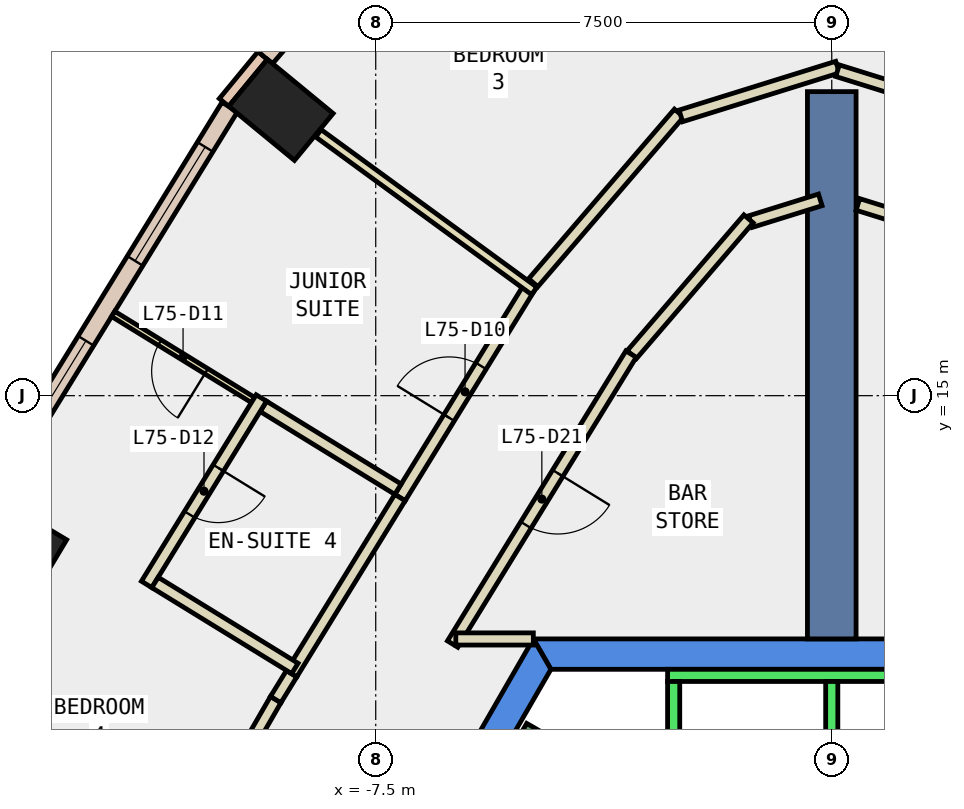
"""IFC4 building model, lengths in metres.
Left out: names, types, materials, properties, quantities, classifications, styles, units other than length and angle.
Written with IfcOpenShell. Run it as: python <this file> out.ifc"""

import sys

from ifc_helpers import new_model, si_unit, direction, frame, frame_2d, origin, origin_2d, place, context, subcontext, project, spatial, polyline, rectangle, outline, extrude, element, fill, save


model = new_model("IFC4")
c1 = context("Model", 3, precision=1e-05, world=origin(), true_north=direction((0.0, 1.0)))
c2 = subcontext(c1, "Body", "Model", "MODEL_VIEW")
j1 = project(units=[si_unit("LENGTHUNIT", "METRE"), si_unit("PLANEANGLEUNIT", "RADIAN")], contexts=[c1])
p1 = place(None, origin())
s1 = spatial("IfcSite", under=j1, at=p1, CompositionType="ELEMENT")
p2 = place(p1, origin())
s2 = spatial("IfcBuilding", under=s1, at=p2, CompositionType="ELEMENT")
p3 = place(p2, frame((0.0, 0.0, 318.8)))
s3 = spatial("IfcBuildingStorey", under=s2, at=p3, CompositionType="ELEMENT", Elevation=318.8)
for number, where, z_axis, x_axis in (
    (1, (-9.059, 19.7, -0.34), (0.0, 0.0, 1.0), (0.636, 0.772, 0.0)),
    (2, (-13.441, 12.561, -0.34), (0.0, 0.0, 1.0), (0.514, 0.858, 0.0)),
):
    element("IfcColumn", number, at=place(p3, frame(where, z_axis=z_axis, x_axis=x_axis)), inside=s3, PredefinedType="COLUMN", context=c2, shape_type="SweptSolid", body=[
        extrude(rectangle(XDim=1.0, YDim=1.4, at=origin_2d()), origin(), (0.0, 0.0, 1.0), 3.6),
    ])
p4 = place(p3, frame((0.0, 0.0, -0.34)))
e3 = element("IfcWall", 3, at=p4, inside=s3, PredefinedType="SHEAR", context=c2, shape_type="SweptSolid", body=[
    extrude(outline(polyline([(4.907, 11.0), (-4.907, 11.0), (-4.619, 10.5), (4.619, 10.5), (4.907, 11.0)])), origin(), (0.0, 0.0, 1.0), 3.6),
])
p5 = place(p3, frame((0.0, 0.0, -0.34)))
e4 = element("IfcWall", 4, at=p5, inside=s3, PredefinedType="SHEAR", context=c2, shape_type="SweptSolid", body=[
    extrude(outline(polyline([(-9.236, 3.502), (-8.803, 3.253), (-4.619, 10.5), (-4.907, 11.0), (-9.236, 3.502)])), origin(), (0.0, 0.0, 1.0), 3.6),
])
p6 = place(p3, frame((0.0, 11.0, -0.34), z_axis=(0.0, 0.0, 1.0), x_axis=(0.0, 1.0, 0.0)))
e5 = element("IfcWall", 5, at=p6, inside=s3, PredefinedType="SHEAR", context=c2, shape_type="SweptSolid", body=[
    extrude(rectangle(XDim=9.0, YDim=0.8, at=frame_2d((4.5, 0.0))), origin(), (0.0, 0.0, 1.0), 3.6),
])
p7 = place(p3, frame((-9.359, 20.594, 0.0), z_axis=(0.0, 0.0, 1.0), x_axis=(-0.635998056672, -0.771690658172, 0.0)))
e6 = element("IfcWall", 6, at=p7, inside=s3, PredefinedType="STANDARD", context=c2, shape_type="SweptSolid", body=[
    extrude(rectangle(XDim=1.0, YDim=0.2, at=frame_2d((0.5, 0.0))), origin(), (0.0, 0.0, 1.0), 3.26),
])
p8 = place(p3, frame((-6.219, 24.156, 0.0), z_axis=(0.0, 0.0, 1.0), x_axis=(-0.651684474108, -0.758490175419, 0.0)))
e7 = element("IfcWall", 7, at=p8, inside=s3, PredefinedType="STANDARD", context=c2, shape_type="SweptSolid", body=[
    extrude(rectangle(XDim=4.748, YDim=0.3, at=frame_2d((2.374, 0.0))), origin(), (0.0, 0.0, 1.0), 3.26),
])
p9 = place(p8, frame((1.674, 0.0, 0.9)))
e8 = element("IfcOpeningElement", 8, at=p9, cuts=e7, PredefinedType="OPENING", context=c2, shape_type="SweptSolid", body=[
    extrude(rectangle(XDim=1.4, YDim=2.0, at=frame_2d((0.7, 1.0))), frame((0.0, 0.16, 0.0), z_axis=(0.0, -1.0, 0.0), x_axis=(1.0, 0.0, 0.0)), (0.0, 0.0, 1.0), 0.32),
])
p10 = place(p3, frame((-9.901, 19.747, 0.0), z_axis=(0.0, 0.0, 1.0), x_axis=(-0.524004608874, -0.851715427757, 0.0)))
e9 = element("IfcWall", 9, at=p10, inside=s3, PredefinedType="STANDARD", context=c2, shape_type="SweptSolid", body=[
    extrude(rectangle(XDim=7.485, YDim=0.3, at=frame_2d((3.742, 0.0))), origin(), (0.0, 0.0, 1.0), 3.26),
])
p11 = place(p10, frame((0.771, 0.0, 0.9)))
e10 = element("IfcOpeningElement", 10, at=p11, cuts=e9, PredefinedType="OPENING", context=c2, shape_type="SweptSolid", body=[
    extrude(rectangle(XDim=2.2, YDim=2.0, at=frame_2d((1.1, 1.0))), frame((0.0, 0.16, 0.0), z_axis=(0.0, -1.0, 0.0), x_axis=(1.0, 0.0, 0.0)), (0.0, 0.0, 1.0), 0.32),
])
p12 = place(p10, frame((4.514, 0.0, 0.9)))
e11 = element("IfcOpeningElement", 11, at=p12, cuts=e9, PredefinedType="OPENING", context=c2, shape_type="SweptSolid", body=[
    extrude(rectangle(XDim=2.2, YDim=2.0, at=frame_2d((1.1, 1.0))), frame((0.0, 0.16, 0.0), z_axis=(0.0, -1.0, 0.0), x_axis=(1.0, 0.0, 0.0)), (0.0, 0.0, 1.0), 0.32),
])
p13 = place(p3, frame((1.339, 17.862, 0.0), z_axis=(0.0, 0.0, 1.0), x_axis=(-0.954826063502, 0.297165254457, 0.0)))
e12 = element("IfcWall", 12, at=p13, inside=s3, PredefinedType="PARTITIONING", context=c2, shape_type="SweptSolid", body=[
    extrude(rectangle(XDim=0.952, YDim=0.2, at=frame_2d((0.476, 0.0))), origin(), (0.0, 0.0, 1.0), 3.26),
])
p14 = place(p3, frame((-0.189, 18.22, 0.0), z_axis=(0.0, 0.0, 1.0), x_axis=(-0.954836332451, -0.297132257137, 0.0)))
e13 = element("IfcWall", 13, at=p14, inside=s3, PredefinedType="PARTITIONING", context=c2, shape_type="SweptSolid", body=[
    extrude(rectangle(XDim=1.205, YDim=0.2, at=frame_2d((0.602, 0.0))), origin(), (0.0, 0.0, 1.0), 3.26),
])
p15 = place(p3, frame((-1.369, 17.908, 0.0), z_axis=(0.0, 0.0, 1.0), x_axis=(-0.651848676423, -0.758349064116, 0.0)))
e14 = element("IfcWall", 14, at=p15, inside=s3, PredefinedType="PARTITIONING", context=c2, shape_type="SweptSolid", body=[
    extrude(rectangle(XDim=2.946, YDim=0.2, at=frame_2d((1.473, 0.0))), origin(), (0.0, 0.0, 1.0), 3.26),
])
p16 = place(p3, frame((-3.301, 15.684, 0.0), z_axis=(0.0, 0.0, 1.0), x_axis=(-0.524004979532, -0.851715199715, 0.0)))
e15 = element("IfcWall", 15, at=p16, inside=s3, PredefinedType="PARTITIONING", context=c2, shape_type="SweptSolid", body=[
    extrude(rectangle(XDim=5.599, YDim=0.2, at=frame_2d((2.8, 0.0))), origin(), (0.0, 0.0, 1.0), 3.26),
])
p17 = place(p16, frame((2.3, 0.0, 0.0)))
e16 = element("IfcOpeningElement", 16, at=p17, cuts=e15, PredefinedType="OPENING", context=c2, shape_type="SweptSolid", body=[
    extrude(rectangle(XDim=1.0, YDim=2.1, at=frame_2d((0.5, 1.05))), frame((0.0, 0.11, 0.0), z_axis=(0.0, -1.0, 0.0), x_axis=(1.0, 0.0, 0.0)), (0.0, 0.0, 1.0), 0.22),
])
p18 = place(p3, frame((-6.183, 10.999, 0.0), z_axis=(0.0, 0.0, 1.0), x_axis=(1.0, 0.0, 0.0)))
e17 = element("IfcWall", 17, at=p18, inside=s3, PredefinedType="PARTITIONING", context=c2, shape_type="SweptSolid", body=[
    extrude(rectangle(XDim=1.275, YDim=0.2, at=frame_2d((0.638, 0.0))), origin(), (0.0, 0.0, 1.0), 3.26),
])
p19 = place(p3, frame((-4.909, 16.858, 0.0), z_axis=(0.0, 0.0, 1.0), x_axis=(0.651785835936, 0.758403074937, 0.0)))
e18 = element("IfcWall", 18, at=p19, inside=s3, PredefinedType="PARTITIONING", context=c2, shape_type="SweptSolid", body=[
    extrude(rectangle(XDim=3.677, YDim=0.2, at=frame_2d((1.839, 0.0))), origin(), (0.0, 0.0, 1.0), 3.26),
])
p20 = place(p3, frame((-2.482, 19.601, 0.0), z_axis=(0.0, 0.0, 1.0), x_axis=(0.95482540871, 0.297167358372, 0.0)))
e19 = element("IfcWall", 19, at=p20, inside=s3, PredefinedType="PARTITIONING", context=c2, shape_type="SweptSolid", body=[
    extrude(rectangle(XDim=2.699, YDim=0.2, at=frame_2d((1.349, 0.0))), origin(), (0.0, 0.0, 1.0), 3.26),
])
p21 = place(p3, frame((0.095, 20.344, 0.0), z_axis=(0.0, 0.0, 1.0), x_axis=(0.954837867825, -0.297127323158, 0.0)))
e20 = element("IfcWall", 20, at=p21, inside=s3, PredefinedType="PARTITIONING", context=c2, shape_type="SweptSolid", body=[
    extrude(rectangle(XDim=2.605, YDim=0.2, at=frame_2d((1.302, 0.0))), origin(), (0.0, 0.0, 1.0), 3.26),
])
p22 = place(p3, frame((-7.101, 13.324, 0.0), z_axis=(0.0, 0.0, 1.0), x_axis=(0.52395735307, 0.851744499344, 0.0)))
e21 = element("IfcWall", 21, at=p22, inside=s3, PredefinedType="PARTITIONING", context=c2, shape_type="SweptSolid", body=[
    extrude(rectangle(XDim=4.084, YDim=0.2, at=frame_2d((2.042, 0.0))), origin(), (0.0, 0.0, 1.0), 3.26),
])
p23 = place(p22, frame((1.542, 0.0, 0.0)))
e22 = element("IfcOpeningElement", 22, at=p23, cuts=e21, PredefinedType="OPENING", context=c2, shape_type="SweptSolid", body=[
    extrude(rectangle(XDim=1.0, YDim=2.1, at=frame_2d((0.5, 1.05))), frame((0.0, 0.11, 0.0), z_axis=(0.0, -1.0, 0.0), x_axis=(1.0, 0.0, 0.0)), (0.0, 0.0, 1.0), 0.22),
])
p24 = place(p3, frame((-11.153, 6.525, 0.0), z_axis=(0.0, 0.0, 1.0), x_axis=(0.500108414701, 0.865962801479, 0.0)))
e23 = element("IfcWall", 23, at=p24, inside=s3, PredefinedType="PARTITIONING", context=c2, shape_type="SweptSolid", body=[
    extrude(rectangle(XDim=4.015, YDim=0.2, at=frame_2d((2.008, 0.0))), origin(), (0.0, 0.0, 1.0), 3.26),
])
p25 = place(p3, frame((-9.145, 10.002, 0.0), z_axis=(0.0, 0.0, 1.0), x_axis=(0.523797791684, 0.851842634192, 0.0)))
e24 = element("IfcWall", 24, at=p25, inside=s3, PredefinedType="PARTITIONING", context=c2, shape_type="SweptSolid", body=[
    extrude(rectangle(XDim=0.5, YDim=0.2, at=frame_2d((0.25, 0.0))), origin(), (0.0, 0.0, 1.0), 3.26),
])
p26 = place(p3, frame((-8.883, 10.428, 0.0), z_axis=(0.0, 0.0, 1.0), x_axis=(0.524061371587, 0.851680502777, 0.0)))
e25 = element("IfcWall", 25, at=p26, inside=s3, PredefinedType="PARTITIONING", context=c2, shape_type="SweptSolid", body=[
    extrude(rectangle(XDim=3.4, YDim=0.2, at=frame_2d((1.7, 0.0))), origin(), (0.0, 0.0, 1.0), 3.26),
])
p27 = place(p3, frame((-4.893, 16.723, 0.0), z_axis=(0.0, 0.0, 1.0), x_axis=(-0.807632235509, 0.589686503294, 0.0)))
e26 = element("IfcWall", 26, at=p27, inside=s3, PredefinedType="PARTITIONING", context=c2, shape_type="SweptSolid", body=[
    extrude(rectangle(XDim=4.396, YDim=0.15, at=frame_2d((2.198, 0.0))), origin(), (0.0, 0.0, 1.0), 3.26),
])
p28 = place(p3, frame((-9.519, 14.929, 0.0), z_axis=(0.0, 0.0, 1.0), x_axis=(-0.851621054013, 0.524157972715, 0.0)))
e27 = element("IfcWall", 27, at=p28, inside=s3, PredefinedType="PARTITIONING", context=c2, shape_type="SweptSolid", body=[
    extrude(rectangle(XDim=2.7, YDim=0.1, at=frame_2d((1.35, 0.0))), origin(), (0.0, 0.0, 1.0), 3.26),
])
p29 = place(p28, frame((0.9, 0.0, 0.0)))
e28 = element("IfcOpeningElement", 28, at=p29, cuts=e27, PredefinedType="OPENING", context=c2, shape_type="SweptSolid", body=[
    extrude(rectangle(XDim=0.9, YDim=2.1, at=frame_2d((0.45, 1.05))), frame((0.0, 0.06, 0.0), z_axis=(0.0, -1.0, 0.0), x_axis=(1.0, 0.0, 0.0)), (0.0, 0.0, 1.0), 0.12),
])
p30 = place(p3, frame((-7.134, 13.462, 0.0), z_axis=(0.0, 0.0, 1.0), x_axis=(-0.851713135301, 0.524008335007, 0.0)))
e29 = element("IfcWall", 29, at=p30, inside=s3, PredefinedType="PARTITIONING", context=c2, shape_type="SweptSolid", body=[
    extrude(rectangle(XDim=2.599, YDim=0.2, at=frame_2d((1.3, 0.0))), origin(), (0.0, 0.0, 1.0), 3.26),
])
p31 = place(p3, frame((-9.381, 14.962, 0.0), z_axis=(0.0, 0.0, 1.0), x_axis=(-0.524146612914, -0.851628045669, 0.0)))
e30 = element("IfcWall", 30, at=p31, inside=s3, PredefinedType="PARTITIONING", context=c2, shape_type="SweptSolid", body=[
    extrude(rectangle(XDim=3.6, YDim=0.2, at=frame_2d((1.8, 0.0))), origin(), (0.0, 0.0, 1.0), 3.26),
])
p32 = place(p31, frame((1.35, 0.0, 0.0)))
e31 = element("IfcOpeningElement", 31, at=p32, cuts=e30, PredefinedType="OPENING", context=c2, shape_type="SweptSolid", body=[
    extrude(rectangle(XDim=0.9, YDim=2.1, at=frame_2d((0.45, 1.05))), frame((0.0, 0.11, 0.0), z_axis=(0.0, -1.0, 0.0), x_axis=(1.0, 0.0, 0.0)), (0.0, 0.0, 1.0), 0.22),
])
p33 = place(p3, frame((-11.13, 11.928, 0.0), z_axis=(0.0, 0.0, 1.0), x_axis=(0.851856970107, -0.523774476737, 0.0)))
e32 = element("IfcWall", 32, at=p33, inside=s3, PredefinedType="PARTITIONING", context=c2, shape_type="SweptSolid", body=[
    extrude(rectangle(XDim=2.7, YDim=0.2, at=frame_2d((1.35, 0.0))), origin(), (0.0, 0.0, 1.0), 3.26),
])
p34 = place(p3, frame((2.7, 10.4, 0.0), z_axis=(0.0, 0.0, 1.0), x_axis=(-1.0, 0.0, 0.0)))
e33 = element("IfcWall", 33, at=p34, inside=s3, PredefinedType="STANDARD", context=c2, shape_type="SweptSolid", body=[
    extrude(rectangle(XDim=5.4, YDim=0.2, at=frame_2d((2.7, 0.0))), origin(), (0.0, 0.0, 1.0), 3.26),
])
for number, where, z_axis, x_axis in (
    (34, (0.0, 7.9, 0.0), (0.0, 0.0, 1.0), (0.0, 1.0, 0.0)),
    (35, (-2.6, 7.9, 0.0), (0.0, 0.0, 1.0), (0.0, 1.0, 0.0)),
):
    element("IfcWall", number, at=place(p3, frame(where, z_axis=z_axis, x_axis=x_axis)), inside=s3, PredefinedType="STANDARD", context=c2, shape_type="SweptSolid", body=[
        extrude(rectangle(XDim=2.4, YDim=0.2, at=frame_2d((1.2, 0.0))), origin(), (0.0, 0.0, 1.0), 3.26),
    ])
p35 = place(p3, frame((-1.256, 7.324, 0.0), z_axis=(0.0, 0.0, 1.0), x_axis=(-0.866046073146, 0.499964197906, 0.0)))
e36 = element("IfcWall", 36, at=p35, inside=s3, PredefinedType="STANDARD", context=c2, shape_type="SweptSolid", body=[
    extrude(rectangle(XDim=4.4, YDim=0.2, at=frame_2d((2.2, 0.0))), origin(), (0.0, 0.0, 1.0), 3.26),
])
p36 = place(p35, frame((2.4, 0.0, 0.0)))
e37 = element("IfcOpeningElement", 37, at=p36, cuts=e36, PredefinedType="OPENING", context=c2, shape_type="SweptSolid", body=[
    extrude(rectangle(XDim=1.1, YDim=2.2, at=frame_2d((0.55, 1.1))), frame((0.0, 0.11, 0.0), z_axis=(0.0, -1.0, 0.0), x_axis=(1.0, 0.0, 0.0)), (0.0, 0.0, 1.0), 0.22),
])
p37 = place(p11, origin())
e38 = element("IfcWindow", 38, at=p37, inside=s3, PartitioningType="SINGLE_PANEL", PredefinedType="WINDOW", context=c2, shape_type="SweptSolid", body=[
    extrude(rectangle(XDim=2.2, YDim=2.0, at=frame_2d((1.1, 1.0))), frame((0.0, 0.03, 0.0), z_axis=(0.0, -1.0, 0.0), x_axis=(1.0, 0.0, 0.0)), (0.0, 0.0, 1.0), 0.06),
])
fill(e10, e38)
p38 = place(p12, origin())
e39 = element("IfcWindow", 39, at=p38, inside=s3, PartitioningType="SINGLE_PANEL", PredefinedType="WINDOW", context=c2, shape_type="SweptSolid", body=[
    extrude(rectangle(XDim=2.2, YDim=2.0, at=frame_2d((1.1, 1.0))), frame((0.0, 0.03, 0.0), z_axis=(0.0, -1.0, 0.0), x_axis=(1.0, 0.0, 0.0)), (0.0, 0.0, 1.0), 0.06),
])
fill(e11, e39)
p39 = place(p23, origin())
e40 = element("IfcDoor", 40, at=p39, inside=s3, OperationType="SINGLE_SWING_LEFT", PredefinedType="DOOR", context=c2, shape_type="SweptSolid", body=[
    extrude(rectangle(XDim=1.0, YDim=2.1, at=frame_2d((0.5, 1.05))), frame((0.0, 0.025, 0.0), z_axis=(0.0, -1.0, 0.0), x_axis=(1.0, 0.0, 0.0)), (0.0, 0.0, 1.0), 0.05),
])
fill(e22, e40)
p40 = place(p29, origin())
e41 = element("IfcDoor", 41, at=p40, inside=s3, OperationType="SINGLE_SWING_RIGHT", PredefinedType="DOOR", context=c2, shape_type="SweptSolid", body=[
    extrude(rectangle(XDim=0.9, YDim=2.1, at=frame_2d((0.45, 1.05))), frame((0.0, 0.025, 0.0), z_axis=(0.0, -1.0, 0.0), x_axis=(1.0, 0.0, 0.0)), (0.0, 0.0, 1.0), 0.05),
])
fill(e28, e41)
p41 = place(p32, origin())
e42 = element("IfcDoor", 42, at=p41, inside=s3, OperationType="SINGLE_SWING_RIGHT", PredefinedType="DOOR", context=c2, shape_type="SweptSolid", body=[
    extrude(rectangle(XDim=0.9, YDim=2.1, at=frame_2d((0.45, 1.05))), frame((0.0, 0.025, 0.0), z_axis=(0.0, -1.0, 0.0), x_axis=(1.0, 0.0, 0.0)), (0.0, 0.0, 1.0), 0.05),
])
fill(e31, e42)
p42 = place(p17, origin())
e43 = element("IfcDoor", 43, at=p42, inside=s3, OperationType="SINGLE_SWING_LEFT", PredefinedType="DOOR", context=c2, shape_type="SweptSolid", body=[
    extrude(rectangle(XDim=1.0, YDim=2.1, at=frame_2d((0.5, 1.05))), frame((0.0, 0.025, 0.0), z_axis=(0.0, -1.0, 0.0), x_axis=(1.0, 0.0, 0.0)), (0.0, 0.0, 1.0), 0.05),
])
fill(e16, e43)
save(model, sys.argv[1])
